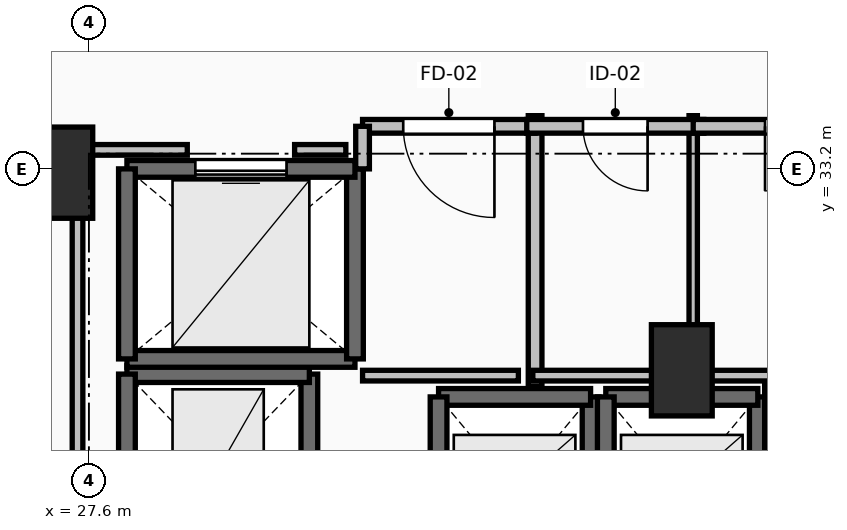
"""IFC4 building model, lengths in metres.
Left out: names, types, materials, properties, quantities, classifications, styles, units other than length and angle.
Written with IfcOpenShell. Run it as: python <this file> out.ifc"""

import sys

from ifc_helpers import new_model, si_unit, direction, frame, frame_2d, origin, origin_2d, place, context, subcontext, project, spatial, rectangle, extrude, element, fill, save


model = new_model("IFC4")
c1 = context("Model", 3, precision=1e-05, world=origin(), true_north=direction((0.0, 1.0)))
c2 = subcontext(c1, "Body", "Model", "MODEL_VIEW")
j1 = project(units=[si_unit("LENGTHUNIT", "METRE"), si_unit("PLANEANGLEUNIT", "RADIAN")], contexts=[c1])
p1 = place(None, origin())
s1 = spatial("IfcSite", under=j1, at=p1, CompositionType="ELEMENT")
p2 = place(p1, origin())
s2 = spatial("IfcBuilding", under=s1, at=p2, CompositionType="ELEMENT")
p3 = place(p2, frame((0.0, 0.0, 74.3)))
s3 = spatial("IfcBuildingStorey", under=s2, at=p3, CompositionType="ELEMENT", Elevation=74.3)
for number, where, z_axis, x_axis in (
    (1, (27.25, 33.15, 0.0), (0.0, 0.0, 1.0), (1.0, 0.0, 0.0)),
    (2, (35.4, 30.55, 0.0), (0.0, 0.0, 1.0), (1.0, 0.0, 0.0)),
):
    element("IfcColumn", number, at=place(p3, frame(where, z_axis=z_axis, x_axis=x_axis)), inside=s3, PredefinedType="PILASTER", context=c2, shape_type="SweptSolid", body=[
        extrude(rectangle(XDim=0.8, YDim=1.2, at=origin_2d()), origin(), (0.0, 0.0, 1.0), 4.5),
    ])
p4 = place(p3, frame((34.2, 27.8, 0.0), z_axis=(0.0, 0.0, 1.0), x_axis=(0.0, 1.0, 0.0)))
e3 = element("IfcWall", 3, at=p4, inside=s3, PredefinedType="SOLIDWALL", context=c2, shape_type="SweptSolid", body=[
    extrude(rectangle(XDim=2.4, YDim=0.22, at=frame_2d((1.2, 0.0))), origin(), (0.0, 0.0, 1.0), 4.24),
])
p5 = place(p3, frame((34.2, 30.2, 0.0), z_axis=(0.0, 0.0, 1.0), x_axis=(-1.0, 0.0, 0.0)))
e4 = element("IfcWall", 4, at=p5, inside=s3, PredefinedType="SOLIDWALL", context=c2, shape_type="SweptSolid", body=[
    extrude(rectangle(XDim=2.0, YDim=0.22, at=frame_2d((1.0, 0.0))), origin(), (0.0, 0.0, 1.0), 4.24),
])
for number, where, z_axis, x_axis in (
    (5, (32.2, 30.2, 0.0), (0.0, 0.0, 1.0), (0.0, -1.0, 0.0)),
    (6, (36.4, 27.8, 0.0), (0.0, 0.0, 1.0), (0.0, 1.0, 0.0)),
):
    element("IfcWall", number, at=place(p3, frame(where, z_axis=z_axis, x_axis=x_axis)), inside=s3, PredefinedType="SOLIDWALL", context=c2, shape_type="SweptSolid", body=[
        extrude(rectangle(XDim=2.4, YDim=0.22, at=frame_2d((1.2, 0.0))), origin(), (0.0, 0.0, 1.0), 4.24),
    ])
p6 = place(p3, frame((36.4, 30.2, 0.0), z_axis=(0.0, 0.0, 1.0), x_axis=(-1.0, 0.0, 0.0)))
e7 = element("IfcWall", 7, at=p6, inside=s3, PredefinedType="SOLIDWALL", context=c2, shape_type="SweptSolid", body=[
    extrude(rectangle(XDim=2.0, YDim=0.22, at=frame_2d((1.0, 0.0))), origin(), (0.0, 0.0, 1.0), 4.24),
])
p7 = place(p3, frame((34.4, 30.2, 0.0), z_axis=(0.0, 0.0, 1.0), x_axis=(0.0, -1.0, 0.0)))
e8 = element("IfcWall", 8, at=p7, inside=s3, PredefinedType="SOLIDWALL", context=c2, shape_type="SweptSolid", body=[
    extrude(rectangle(XDim=2.4, YDim=0.22, at=frame_2d((1.2, 0.0))), origin(), (0.0, 0.0, 1.0), 4.24),
])
p8 = place(p3, frame((36.6, 30.4, 0.0), z_axis=(0.0, 0.0, 1.0), x_axis=(0.0, -1.0, 0.0)))
e9 = element("IfcWall", 9, at=p8, inside=s3, PredefinedType="SOLIDWALL", context=c2, shape_type="SweptSolid", body=[
    extrude(rectangle(XDim=2.6, YDim=0.22, at=frame_2d((1.3, 0.0))), origin(), (0.0, 0.0, 1.0), 4.24),
])
p9 = place(p3, frame((30.5, 28.0, 0.0), z_axis=(0.0, 0.0, 1.0), x_axis=(0.0, 1.0, 0.0)))
e10 = element("IfcWall", 10, at=p9, inside=s3, PredefinedType="SHEAR", context=c2, shape_type="SweptSolid", body=[
    extrude(rectangle(XDim=2.5, YDim=0.22, at=frame_2d((1.25, 0.0))), origin(), (0.0, 0.0, 1.0), 4.24),
])
p10 = place(p3, frame((30.5, 30.5, 0.0), z_axis=(0.0, 0.0, 1.0), x_axis=(-1.0, 0.0, 0.0)))
e11 = element("IfcWall", 11, at=p10, inside=s3, PredefinedType="SHEAR", context=c2, shape_type="SweptSolid", body=[
    extrude(rectangle(XDim=2.4, YDim=0.22, at=frame_2d((1.2, 0.0))), origin(), (0.0, 0.0, 1.0), 4.24),
])
p11 = place(p3, frame((28.1, 30.5, 0.0), z_axis=(0.0, 0.0, 1.0), x_axis=(0.0, -1.0, 0.0)))
e12 = element("IfcWall", 12, at=p11, inside=s3, PredefinedType="SHEAR", context=c2, shape_type="SweptSolid", body=[
    extrude(rectangle(XDim=2.5, YDim=0.22, at=frame_2d((1.25, 0.0))), origin(), (0.0, 0.0, 1.0), 4.24),
])
p12 = place(p3, frame((28.1, 30.7, 0.0), z_axis=(0.0, 0.0, 1.0), x_axis=(1.0, 0.0, 0.0)))
e13 = element("IfcWall", 13, at=p12, inside=s3, PredefinedType="SOLIDWALL", context=c2, shape_type="SweptSolid", body=[
    extrude(rectangle(XDim=3.0, YDim=0.22, at=frame_2d((1.5, 0.0))), origin(), (0.0, 0.0, 1.0), 4.24),
])
p13 = place(p3, frame((31.1, 30.7, 0.0), z_axis=(0.0, 0.0, 1.0), x_axis=(0.0, 1.0, 0.0)))
e14 = element("IfcWall", 14, at=p13, inside=s3, PredefinedType="SOLIDWALL", context=c2, shape_type="SweptSolid", body=[
    extrude(rectangle(XDim=2.5, YDim=0.22, at=frame_2d((1.25, 0.0))), origin(), (0.0, 0.0, 1.0), 4.24),
])
p14 = place(p3, frame((31.1, 33.2, 0.0), z_axis=(0.0, 0.0, 1.0), x_axis=(-1.0, 0.0, 0.0)))
e15 = element("IfcWall", 15, at=p14, inside=s3, PredefinedType="SOLIDWALL", context=c2, shape_type="SweptSolid", body=[
    extrude(rectangle(XDim=3.0, YDim=0.22, at=frame_2d((1.5, 0.0))), origin(), (0.0, 0.0, 1.0), 4.24),
])
p15 = place(p14, frame((0.9, 0.0, 0.0)))
e16 = element("IfcOpeningElement", 16, at=p15, cuts=e15, PredefinedType="OPENING", context=c2, shape_type="SweptSolid", body=[
    extrude(rectangle(XDim=1.2, YDim=2.2, at=frame_2d((0.6, 1.1))), frame((0.0, 0.125, 0.0), z_axis=(0.0, -1.0, 0.0), x_axis=(1.0, 0.0, 0.0)), (0.0, 0.0, 1.0), 0.25),
])
p16 = place(p3, frame((28.1, 33.2, 0.0), z_axis=(0.0, 0.0, 1.0), x_axis=(0.0, -1.0, 0.0)))
e17 = element("IfcWall", 17, at=p16, inside=s3, PredefinedType="SOLIDWALL", context=c2, shape_type="SweptSolid", body=[
    extrude(rectangle(XDim=2.5, YDim=0.22, at=frame_2d((1.25, 0.0))), origin(), (0.0, 0.0, 1.0), 4.24),
])
p17 = place(p3, frame((33.47, 30.34, 0.0), z_axis=(0.0, 0.0, 1.0), x_axis=(0.0, 1.0, 0.0)))
e18 = element("IfcWall", 18, at=p17, inside=s3, PredefinedType="PARTITIONING", context=c2, shape_type="SweptSolid", body=[
    extrude(rectangle(XDim=3.56, YDim=0.18, at=frame_2d((1.78, 0.0))), origin(), (0.0, 0.0, 1.0), 4.24),
])
p18 = place(p3, frame((33.47, 33.76, 0.0), z_axis=(0.0, 0.0, 1.0), x_axis=(-1.0, 0.0, 0.0)))
e19 = element("IfcWall", 19, at=p18, inside=s3, PredefinedType="PARTITIONING", context=c2, shape_type="SweptSolid", body=[
    extrude(rectangle(XDim=2.27, YDim=0.18, at=frame_2d((1.135, 0.0))), origin(), (0.0, 0.0, 1.0), 4.24),
])
p19 = place(p18, frame((0.535, 0.0, 0.0)))
e20 = element("IfcOpeningElement", 20, at=p19, cuts=e19, PredefinedType="OPENING", context=c2, shape_type="SweptSolid", body=[
    extrude(rectangle(XDim=1.2, YDim=2.15, at=frame_2d((0.6, 1.075))), frame((0.0, 0.105, 0.0), z_axis=(0.0, -1.0, 0.0), x_axis=(1.0, 0.0, 0.0)), (0.0, 0.0, 1.0), 0.21),
])
p20 = place(p3, frame((31.2, 33.76, 0.0), z_axis=(0.0, 0.0, 1.0), x_axis=(0.0, -1.0, 0.0)))
e21 = element("IfcWall", 21, at=p20, inside=s3, PredefinedType="PARTITIONING", context=c2, shape_type="SweptSolid", body=[
    extrude(rectangle(XDim=0.56, YDim=0.18, at=frame_2d((0.28, 0.0))), origin(), (0.0, 0.0, 1.0), 4.24),
])
p21 = place(p3, frame((35.55, 30.34, 0.0), z_axis=(0.0, 0.0, 1.0), x_axis=(0.0, 1.0, 0.0)))
e22 = element("IfcWall", 22, at=p21, inside=s3, PredefinedType="PARTITIONING", context=c2, shape_type="SweptSolid", body=[
    extrude(rectangle(XDim=3.56, YDim=0.11, at=frame_2d((1.78, 0.0))), origin(), (0.0, 0.0, 1.0), 3.432),
])
p22 = place(p3, frame((35.69, 33.76, 0.0), z_axis=(0.0, 0.0, 1.0), x_axis=(-1.0, 0.0, 0.0)))
e23 = element("IfcWall", 23, at=p22, inside=s3, PredefinedType="PARTITIONING", context=c2, shape_type="SweptSolid", body=[
    extrude(rectangle(XDim=2.33, YDim=0.18, at=frame_2d((1.165, 0.0))), origin(), (0.0, 0.0, 1.0), 4.24),
])
p23 = place(p22, frame((0.74, 0.0, 0.0)))
e24 = element("IfcOpeningElement", 24, at=p23, cuts=e23, PredefinedType="OPENING", context=c2, shape_type="SweptSolid", body=[
    extrude(rectangle(XDim=0.85, YDim=2.1, at=frame_2d((0.425, 1.05))), frame((0.0, 0.105, 0.0), z_axis=(0.0, -1.0, 0.0), x_axis=(1.0, 0.0, 0.0)), (0.0, 0.0, 1.0), 0.21),
])
p24 = place(p3, frame((38.29, 33.76, 0.0), z_axis=(0.0, 0.0, 1.0), x_axis=(-1.0, 0.0, 0.0)))
e25 = element("IfcWall", 25, at=p24, inside=s3, PredefinedType="PARTITIONING", context=c2, shape_type="SweptSolid", body=[
    extrude(rectangle(XDim=2.74, YDim=0.18, at=frame_2d((1.37, 0.0))), origin(), (0.0, 0.0, 1.0), 4.24),
])
p25 = place(p24, frame((0.945, 0.0, 0.0)))
e26 = element("IfcOpeningElement", 26, at=p25, cuts=e25, PredefinedType="OPENING", context=c2, shape_type="SweptSolid", body=[
    extrude(rectangle(XDim=0.85, YDim=2.1, at=frame_2d((0.425, 1.05))), frame((0.0, 0.105, 0.0), z_axis=(0.0, -1.0, 0.0), x_axis=(1.0, 0.0, 0.0)), (0.0, 0.0, 1.0), 0.21),
])
p26 = place(p3, frame((31.2, 30.48, 0.0), z_axis=(0.0, 0.0, 1.0), x_axis=(1.0, 0.0, 0.0)))
e27 = element("IfcWall", 27, at=p26, inside=s3, PredefinedType="PARTITIONING", context=c2, shape_type="SweptSolid", body=[
    extrude(rectangle(XDim=2.05, YDim=0.14, at=frame_2d((1.025, 0.0))), origin(), (0.0, 0.0, 1.0), 4.24),
])
p27 = place(p3, frame((33.44, 30.48, 0.0), z_axis=(0.0, 0.0, 1.0), x_axis=(1.0, 0.0, 0.0)))
e28 = element("IfcWall", 28, at=p27, inside=s3, PredefinedType="PARTITIONING", context=c2, shape_type="SweptSolid", body=[
    extrude(rectangle(XDim=2.14, YDim=0.14, at=frame_2d((1.07, 0.0))), origin(), (0.0, 0.0, 1.0), 3.432),
])
p28 = place(p3, frame((35.6, 30.48, 0.0), z_axis=(0.0, 0.0, 1.0), x_axis=(1.0, 0.0, 0.0)))
e29 = element("IfcWall", 29, at=p28, inside=s3, PredefinedType="PARTITIONING", context=c2, shape_type="SweptSolid", body=[
    extrude(rectangle(XDim=1.065, YDim=0.14, at=frame_2d((0.532, 0.0))), origin(), (0.0, 0.0, 1.0), 3.432),
])
p29 = place(p3, frame((27.45, 28.196, 0.0), z_axis=(0.0, 0.0, 1.0), x_axis=(0.0, 1.0, 0.0)))
e30 = element("IfcWall", 30, at=p29, inside=s3, PredefinedType="PARTITIONING", context=c2, shape_type="SweptSolid", body=[
    extrude(rectangle(XDim=5.254, YDim=0.14, at=frame_2d((2.627, 0.0))), origin(), (0.0, 0.0, 1.0), 3.432),
])
p30 = place(p3, frame((27.45, 33.45, 0.0), z_axis=(0.0, 0.0, 1.0), x_axis=(1.0, 0.0, 0.0)))
e31 = element("IfcWall", 31, at=p30, inside=s3, PredefinedType="PARTITIONING", context=c2, shape_type="SweptSolid", body=[
    extrude(rectangle(XDim=1.444, YDim=0.14, at=frame_2d((0.722, 0.0))), origin(), (0.0, 0.0, 1.0), 3.432),
])
p31 = place(p3, frame((30.306, 33.45, 0.0), z_axis=(0.0, 0.0, 1.0), x_axis=(1.0, 0.0, 0.0)))
e32 = element("IfcWall", 32, at=p31, inside=s3, PredefinedType="PARTITIONING", context=c2, shape_type="SweptSolid", body=[
    extrude(rectangle(XDim=0.674, YDim=0.14, at=frame_2d((0.337, 0.0))), origin(), (0.0, 0.0, 1.0), 4.24),
])
p32 = place(p15, origin())
e33 = element("IfcDoor", 33, at=p32, inside=s3, OperationType="SLIDING_TO_LEFT", PredefinedType="DOOR", context=c2, shape_type="SweptSolid", body=[
    extrude(rectangle(XDim=1.2, YDim=2.2, at=frame_2d((0.6, 1.1))), frame((0.0, 0.025, 0.0), z_axis=(0.0, -1.0, 0.0), x_axis=(1.0, 0.0, 0.0)), (0.0, 0.0, 1.0), 0.05),
])
fill(e16, e33)
p33 = place(p19, origin())
e34 = element("IfcDoor", 34, at=p33, inside=s3, OperationType="SINGLE_SWING_LEFT", PredefinedType="DOOR", context=c2, shape_type="SweptSolid", body=[
    extrude(rectangle(XDim=1.2, YDim=2.15, at=frame_2d((0.6, 1.075))), frame((0.0, 0.025, 0.0), z_axis=(0.0, -1.0, 0.0), x_axis=(1.0, 0.0, 0.0)), (0.0, 0.0, 1.0), 0.05),
])
fill(e20, e34)
p34 = place(p23, origin())
e35 = element("IfcDoor", 35, at=p34, inside=s3, OperationType="SINGLE_SWING_LEFT", PredefinedType="DOOR", context=c2, shape_type="SweptSolid", body=[
    extrude(rectangle(XDim=0.85, YDim=2.1, at=frame_2d((0.425, 1.05))), frame((0.0, 0.025, 0.0), z_axis=(0.0, -1.0, 0.0), x_axis=(1.0, 0.0, 0.0)), (0.0, 0.0, 1.0), 0.05),
])
fill(e24, e35)
p35 = place(p25, origin())
e36 = element("IfcDoor", 36, at=p35, inside=s3, OperationType="SINGLE_SWING_RIGHT", PredefinedType="DOOR", context=c2, shape_type="SweptSolid", body=[
    extrude(rectangle(XDim=0.85, YDim=2.1, at=frame_2d((0.425, 1.05))), frame((0.0, 0.025, 0.0), z_axis=(0.0, -1.0, 0.0), x_axis=(1.0, 0.0, 0.0)), (0.0, 0.0, 1.0), 0.05),
])
fill(e26, e36)
save(model, sys.argv[1])
